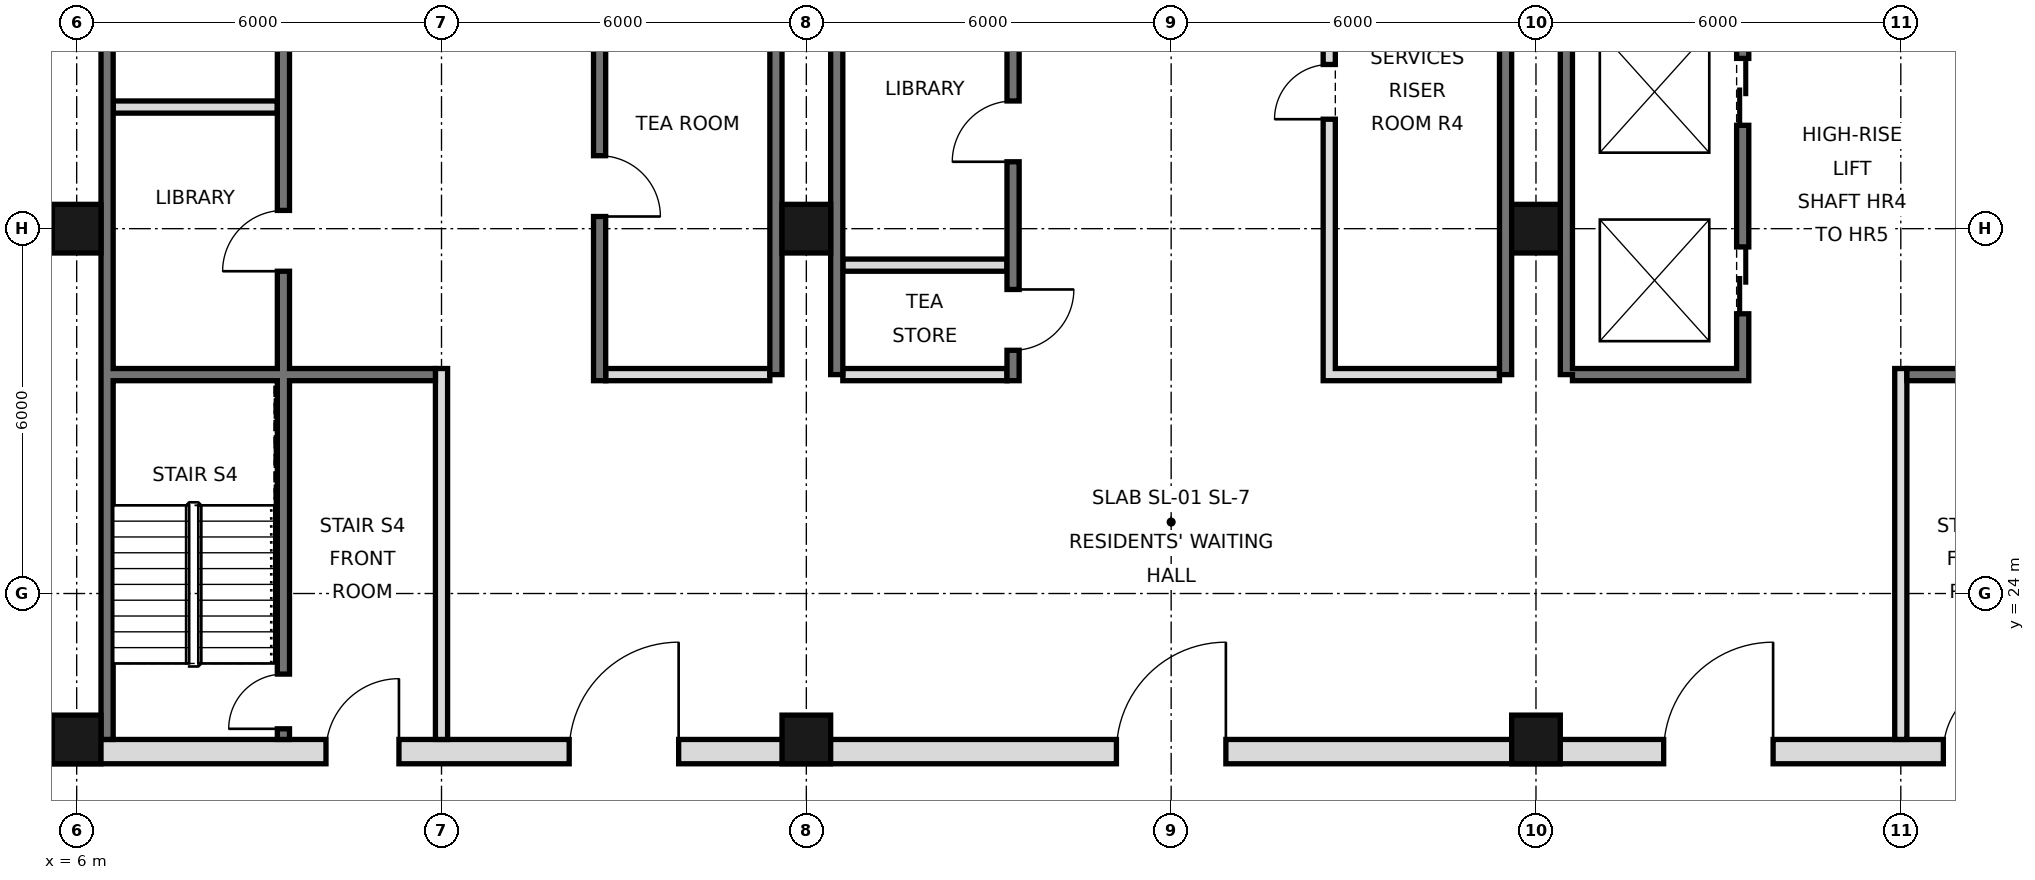
"""IFC4 building model, lengths in metres.
Left out: names, types, materials, properties, quantities, classifications, styles, units other than length and angle.
Written with IfcOpenShell. Run it as: python <this file> out.ifc"""

import sys

from ifc_helpers import new_model, si_unit, direction, frame, frame_2d, origin, origin_2d, place, context, subcontext, project, spatial, rectangle, hollow_rectangle, extrude, element, fill, save


model = new_model("IFC4")
c1 = context("Model", 3, precision=1e-05, world=origin(), true_north=direction((0.0, 1.0)))
c2 = subcontext(c1, "Body", "Model", "MODEL_VIEW")
j1 = project(units=[si_unit("LENGTHUNIT", "METRE"), si_unit("PLANEANGLEUNIT", "RADIAN")], contexts=[c1])
p1 = place(None, origin())
s1 = spatial("IfcSite", under=j1, at=p1, CompositionType="ELEMENT")
p2 = place(p1, origin())
s2 = spatial("IfcBuilding", under=s1, at=p2, CompositionType="ELEMENT")
p3 = place(p2, frame((0.0, 0.0, 226.2)))
s3 = spatial("IfcBuildingStorey", under=s2, at=p3, CompositionType="ELEMENT", Elevation=226.2)
for number, where, z_axis, x_axis in (
    (1, (6.0, 21.6, 0.0), (0.0, 0.0, 1.0), (1.0, 0.0, 0.0)),
    (2, (6.0, 30.0, 0.0), (0.0, 0.0, 1.0), (1.0, 0.0, 0.0)),
    (3, (18.0, 21.6, 0.0), (0.0, 0.0, 1.0), (1.0, 0.0, 0.0)),
    (4, (18.0, 30.0, 0.0), (0.0, 0.0, 1.0), (1.0, 0.0, 0.0)),
    (5, (30.0, 21.6, 0.0), (0.0, 0.0, 1.0), (1.0, 0.0, 0.0)),
    (6, (30.0, 30.0, 0.0), (0.0, 0.0, 1.0), (1.0, 0.0, 0.0)),
):
    element("IfcColumn", number, at=place(p3, frame(where, z_axis=z_axis, x_axis=x_axis)), inside=s3, PredefinedType="COLUMN", context=c2, shape_type="SweptSolid", body=[
        extrude(hollow_rectangle(XDim=0.8, YDim=0.8, WallThickness=0.04, at=origin_2d()), origin(), (0.0, 0.0, 1.0), 3.6),
    ])
p4 = place(p3, frame((6.5, 21.6, 0.0), z_axis=(0.0, 0.0, 1.0), x_axis=(0.0, 1.0, 0.0)))
e7 = element("IfcWall", 7, at=p4, inside=s3, PredefinedType="SOLIDWALL", context=c2, shape_type="SweptSolid", body=[
    extrude(rectangle(XDim=23.5, YDim=0.2, at=frame_2d((11.75, 0.0))), origin(), (0.0, 0.0, 1.0), 3.42),
])
for number, where, z_axis, x_axis in (
    (8, (17.5, 27.6, 0.0), (0.0, 0.0, 1.0), (0.0, 1.0, 0.0)),
    (9, (18.5, 27.6, 0.0), (0.0, 0.0, 1.0), (0.0, 1.0, 0.0)),
    (10, (29.5, 27.6, 0.0), (0.0, 0.0, 1.0), (0.0, 1.0, 0.0)),
    (11, (30.5, 27.6, 0.0), (0.0, 0.0, 1.0), (0.0, 1.0, 0.0)),
):
    element("IfcWall", number, at=place(p3, frame(where, z_axis=z_axis, x_axis=x_axis)), inside=s3, PredefinedType="SOLIDWALL", context=c2, shape_type="SweptSolid", body=[
        extrude(rectangle(XDim=17.5, YDim=0.2, at=frame_2d((8.75, 0.0))), origin(), (0.0, 0.0, 1.0), 3.42),
    ])
p5 = place(p3, frame((5.6, 21.4, 0.0), z_axis=(0.0, 0.0, 1.0), x_axis=(1.0, 0.0, 0.0)))
e12 = element("IfcWall", 12, at=p5, inside=s3, PredefinedType="SOLIDWALL", context=c2, shape_type="SweptSolid", body=[
    extrude(rectangle(XDim=36.8, YDim=0.4, at=frame_2d((18.4, 0.0))), origin(), (0.0, 0.0, 1.0), 3.42),
])
p6 = place(p5, frame((8.5, 0.0, 0.0)))
e13 = element("IfcOpeningElement", 13, at=p6, cuts=e12, PredefinedType="OPENING", context=c2, shape_type="SweptSolid", body=[
    extrude(rectangle(XDim=1.8, YDim=2.1, at=frame_2d((0.9, 1.05))), frame((0.0, 0.21, 0.0), z_axis=(0.0, -1.0, 0.0), x_axis=(1.0, 0.0, 0.0)), (0.0, 0.0, 1.0), 0.42),
])
p7 = place(p5, frame((17.5, 0.0, 0.0)))
e14 = element("IfcOpeningElement", 14, at=p7, cuts=e12, PredefinedType="OPENING", context=c2, shape_type="SweptSolid", body=[
    extrude(rectangle(XDim=1.8, YDim=2.1, at=frame_2d((0.9, 1.05))), frame((0.0, 0.21, 0.0), z_axis=(0.0, -1.0, 0.0), x_axis=(1.0, 0.0, 0.0)), (0.0, 0.0, 1.0), 0.42),
])
p8 = place(p5, frame((26.5, 0.0, 0.0)))
e15 = element("IfcOpeningElement", 15, at=p8, cuts=e12, PredefinedType="OPENING", context=c2, shape_type="SweptSolid", body=[
    extrude(rectangle(XDim=1.8, YDim=2.1, at=frame_2d((0.9, 1.05))), frame((0.0, 0.21, 0.0), z_axis=(0.0, -1.0, 0.0), x_axis=(1.0, 0.0, 0.0)), (0.0, 0.0, 1.0), 0.42),
])
p9 = place(p5, frame((4.5, 0.0, 0.0)))
e16 = element("IfcOpeningElement", 16, at=p9, cuts=e12, PredefinedType="OPENING", context=c2, shape_type="SweptSolid", body=[
    extrude(rectangle(XDim=1.2, YDim=2.1, at=frame_2d((0.6, 1.05))), frame((0.0, 0.21, 0.0), z_axis=(0.0, -1.0, 0.0), x_axis=(1.0, 0.0, 0.0)), (0.0, 0.0, 1.0), 0.42),
])
p10 = place(p5, frame((31.1, 0.0, 0.0)))
e17 = element("IfcOpeningElement", 17, at=p10, cuts=e12, PredefinedType="OPENING", context=c2, shape_type="SweptSolid", body=[
    extrude(rectangle(XDim=1.2, YDim=2.1, at=frame_2d((0.6, 1.05))), frame((0.0, 0.21, 0.0), z_axis=(0.0, -1.0, 0.0), x_axis=(1.0, 0.0, 0.0)), (0.0, 0.0, 1.0), 0.42),
])
p11 = place(p3, frame((12.0, 21.6, 0.0), z_axis=(0.0, 0.0, 1.0), x_axis=(0.0, 1.0, 0.0)))
e18 = element("IfcWall", 18, at=p11, inside=s3, PredefinedType="PARTITIONING", context=c2, shape_type="SweptSolid", body=[
    extrude(rectangle(XDim=6.1, YDim=0.2, at=frame_2d((3.05, 0.0))), origin(), (0.0, 0.0, 1.0), 3.42),
])
p12 = place(p3, frame((14.6, 27.5, 0.0), z_axis=(0.0, 0.0, 1.0), x_axis=(0.0, 1.0, 0.0)))
e19 = element("IfcWall", 19, at=p12, inside=s3, PredefinedType="SOLIDWALL", context=c2, shape_type="SweptSolid", body=[
    extrude(rectangle(XDim=17.5, YDim=0.2, at=frame_2d((8.75, 0.0))), origin(), (0.0, 0.0, 1.0), 3.42),
])
p13 = place(p12, frame((15.4, 0.0, 0.0)))
e20 = element("IfcOpeningElement", 20, at=p13, cuts=e19, PredefinedType="OPENING", context=c2, shape_type="SweptSolid", body=[
    extrude(rectangle(XDim=1.1, YDim=2.1, at=frame_2d((0.55, 1.05))), frame((0.0, 0.11, 0.0), z_axis=(0.0, -1.0, 0.0), x_axis=(1.0, 0.0, 0.0)), (0.0, 0.0, 1.0), 0.22),
])
p14 = place(p12, frame((2.7, 0.0, 0.0)))
e21 = element("IfcOpeningElement", 21, at=p14, cuts=e19, PredefinedType="OPENING", context=c2, shape_type="SweptSolid", body=[
    extrude(rectangle(XDim=1.0, YDim=2.1, at=frame_2d((0.5, 1.05))), frame((0.0, 0.11, 0.0), z_axis=(0.0, -1.0, 0.0), x_axis=(1.0, 0.0, 0.0)), (0.0, 0.0, 1.0), 0.22),
])
p15 = place(p12, frame((9.9, 0.0, 0.0)))
e22 = element("IfcOpeningElement", 22, at=p15, cuts=e19, PredefinedType="OPENING", context=c2, shape_type="SweptSolid", body=[
    extrude(rectangle(XDim=0.9, YDim=2.1, at=frame_2d((0.45, 1.05))), frame((0.0, 0.11, 0.0), z_axis=(0.0, -1.0, 0.0), x_axis=(1.0, 0.0, 0.0)), (0.0, 0.0, 1.0), 0.22),
])
p16 = place(p3, frame((21.4, 27.5, 0.0), z_axis=(0.0, 0.0, 1.0), x_axis=(0.0, 1.0, 0.0)))
e23 = element("IfcWall", 23, at=p16, inside=s3, PredefinedType="SOLIDWALL", context=c2, shape_type="SweptSolid", body=[
    extrude(rectangle(XDim=17.5, YDim=0.2, at=frame_2d((8.75, 0.0))), origin(), (0.0, 0.0, 1.0), 3.42),
])
p17 = place(p16, frame((0.5, 0.0, 0.0)))
e24 = element("IfcOpeningElement", 24, at=p17, cuts=e23, PredefinedType="OPENING", context=c2, shape_type="SweptSolid", body=[
    extrude(rectangle(XDim=1.0, YDim=2.1, at=frame_2d((0.5, 1.05))), frame((0.0, 0.11, 0.0), z_axis=(0.0, -1.0, 0.0), x_axis=(1.0, 0.0, 0.0)), (0.0, 0.0, 1.0), 0.22),
])
p18 = place(p16, frame((3.6, 0.0, 0.0)))
e25 = element("IfcOpeningElement", 25, at=p18, cuts=e23, PredefinedType="OPENING", context=c2, shape_type="SweptSolid", body=[
    extrude(rectangle(XDim=1.0, YDim=2.1, at=frame_2d((0.5, 1.05))), frame((0.0, 0.11, 0.0), z_axis=(0.0, -1.0, 0.0), x_axis=(1.0, 0.0, 0.0)), (0.0, 0.0, 1.0), 0.22),
])
p19 = place(p16, frame((16.2, 0.0, 0.0)))
e26 = element("IfcOpeningElement", 26, at=p19, cuts=e23, PredefinedType="OPENING", context=c2, shape_type="SweptSolid", body=[
    extrude(rectangle(XDim=1.0, YDim=2.1, at=frame_2d((0.5, 1.05))), frame((0.0, 0.11, 0.0), z_axis=(0.0, -1.0, 0.0), x_axis=(1.0, 0.0, 0.0)), (0.0, 0.0, 1.0), 0.22),
])
p20 = place(p16, frame((7.4, 0.0, 0.0)))
e27 = element("IfcOpeningElement", 27, at=p20, cuts=e23, PredefinedType="OPENING", context=c2, shape_type="SweptSolid", body=[
    extrude(rectangle(XDim=0.9, YDim=2.1, at=frame_2d((0.45, 1.05))), frame((0.0, 0.11, 0.0), z_axis=(0.0, -1.0, 0.0), x_axis=(1.0, 0.0, 0.0)), (0.0, 0.0, 1.0), 0.22),
])
p21 = place(p3, frame((26.6, 27.5, 0.0), z_axis=(0.0, 0.0, 1.0), x_axis=(0.0, 1.0, 0.0)))
e28 = element("IfcWall", 28, at=p21, inside=s3, PredefinedType="SOLIDWALL", context=c2, shape_type="SweptSolid", body=[
    extrude(rectangle(XDim=17.5, YDim=0.2, at=frame_2d((8.75, 0.0))), origin(), (0.0, 0.0, 1.0), 3.42),
])
p22 = place(p21, frame((4.3, 0.0, 0.0)))
e29 = element("IfcOpeningElement", 29, at=p22, cuts=e28, PredefinedType="OPENING", context=c2, shape_type="SweptSolid", body=[
    extrude(rectangle(XDim=0.9, YDim=2.1, at=frame_2d((0.45, 1.05))), frame((0.0, 0.11, 0.0), z_axis=(0.0, -1.0, 0.0), x_axis=(1.0, 0.0, 0.0)), (0.0, 0.0, 1.0), 0.22),
])
p23 = place(p21, frame((10.35, 0.0, 0.0)))
e30 = element("IfcOpeningElement", 30, at=p23, cuts=e28, PredefinedType="OPENING", context=c2, shape_type="SweptSolid", body=[
    extrude(rectangle(XDim=1.0, YDim=2.1, at=frame_2d((0.5, 1.05))), frame((0.0, 0.11, 0.0), z_axis=(0.0, -1.0, 0.0), x_axis=(1.0, 0.0, 0.0)), (0.0, 0.0, 1.0), 0.22),
])
p24 = place(p21, frame((14.575, 0.0, 0.0)))
e31 = element("IfcOpeningElement", 31, at=p24, cuts=e28, PredefinedType="OPENING", context=c2, shape_type="SweptSolid", body=[
    extrude(rectangle(XDim=1.0, YDim=2.1, at=frame_2d((0.5, 1.05))), frame((0.0, 0.11, 0.0), z_axis=(0.0, -1.0, 0.0), x_axis=(1.0, 0.0, 0.0)), (0.0, 0.0, 1.0), 0.22),
])
p25 = place(p3, frame((33.4, 27.5, 0.0), z_axis=(0.0, 0.0, 1.0), x_axis=(0.0, 1.0, 0.0)))
e32 = element("IfcWall", 32, at=p25, inside=s3, PredefinedType="SOLIDWALL", context=c2, shape_type="SweptSolid", body=[
    extrude(rectangle(XDim=17.5, YDim=0.2, at=frame_2d((8.75, 0.0))), origin(), (0.0, 0.0, 1.0), 3.42),
])
p26 = place(p25, frame((1.1, 0.0, 0.0)))
e33 = element("IfcOpeningElement", 33, at=p26, cuts=e32, PredefinedType="OPENING", context=c2, shape_type="SweptSolid", body=[
    extrude(rectangle(XDim=1.1, YDim=2.1, at=frame_2d((0.55, 1.05))), frame((0.0, 0.11, 0.0), z_axis=(0.0, -1.0, 0.0), x_axis=(1.0, 0.0, 0.0)), (0.0, 0.0, 1.0), 0.22),
])
p27 = place(p25, frame((4.2, 0.0, 0.0)))
e34 = element("IfcOpeningElement", 34, at=p27, cuts=e32, PredefinedType="OPENING", context=c2, shape_type="SweptSolid", body=[
    extrude(rectangle(XDim=1.1, YDim=2.1, at=frame_2d((0.55, 1.05))), frame((0.0, 0.11, 0.0), z_axis=(0.0, -1.0, 0.0), x_axis=(1.0, 0.0, 0.0)), (0.0, 0.0, 1.0), 0.22),
])
p28 = place(p25, frame((15.4, 0.0, 0.0)))
e35 = element("IfcOpeningElement", 35, at=p28, cuts=e32, PredefinedType="OPENING", context=c2, shape_type="SweptSolid", body=[
    extrude(rectangle(XDim=1.1, YDim=2.1, at=frame_2d((0.55, 1.05))), frame((0.0, 0.11, 0.0), z_axis=(0.0, -1.0, 0.0), x_axis=(1.0, 0.0, 0.0)), (0.0, 0.0, 1.0), 0.22),
])
p29 = place(p25, frame((9.9, 0.0, 0.0)))
e36 = element("IfcOpeningElement", 36, at=p29, cuts=e32, PredefinedType="OPENING", context=c2, shape_type="SweptSolid", body=[
    extrude(rectangle(XDim=0.9, YDim=2.1, at=frame_2d((0.45, 1.05))), frame((0.0, 0.11, 0.0), z_axis=(0.0, -1.0, 0.0), x_axis=(1.0, 0.0, 0.0)), (0.0, 0.0, 1.0), 0.22),
])
p30 = place(p3, frame((36.0, 21.6, 0.0), z_axis=(0.0, 0.0, 1.0), x_axis=(0.0, 1.0, 0.0)))
e37 = element("IfcWall", 37, at=p30, inside=s3, PredefinedType="PARTITIONING", context=c2, shape_type="SweptSolid", body=[
    extrude(rectangle(XDim=6.1, YDim=0.2, at=frame_2d((3.05, 0.0))), origin(), (0.0, 0.0, 1.0), 3.42),
])
p31 = place(p3, frame((9.4, 21.6, 0.0), z_axis=(0.0, 0.0, 1.0), x_axis=(0.0, 1.0, 0.0)))
e38 = element("IfcWall", 38, at=p31, inside=s3, PredefinedType="SOLIDWALL", context=c2, shape_type="SweptSolid", body=[
    extrude(rectangle(XDim=23.4, YDim=0.2, at=frame_2d((11.7, 0.0))), origin(), (0.0, 0.0, 1.0), 3.42),
])
p32 = place(p31, frame((7.7, 0.0, 0.0)))
e39 = element("IfcOpeningElement", 39, at=p32, cuts=e38, PredefinedType="OPENING", context=c2, shape_type="SweptSolid", body=[
    extrude(rectangle(XDim=1.0, YDim=2.1, at=frame_2d((0.5, 1.05))), frame((0.0, 0.11, 0.0), z_axis=(0.0, -1.0, 0.0), x_axis=(1.0, 0.0, 0.0)), (0.0, 0.0, 1.0), 0.22),
])
p33 = place(p31, frame((12.35, 0.0, 0.0)))
e40 = element("IfcOpeningElement", 40, at=p33, cuts=e38, PredefinedType="OPENING", context=c2, shape_type="SweptSolid", body=[
    extrude(rectangle(XDim=1.0, YDim=2.1, at=frame_2d((0.5, 1.05))), frame((0.0, 0.11, 0.0), z_axis=(0.0, -1.0, 0.0), x_axis=(1.0, 0.0, 0.0)), (0.0, 0.0, 1.0), 0.22),
])
p34 = place(p31, frame((22.1, 0.0, 0.0)))
e41 = element("IfcOpeningElement", 41, at=p34, cuts=e38, PredefinedType="OPENING", context=c2, shape_type="SweptSolid", body=[
    extrude(rectangle(XDim=1.0, YDim=2.1, at=frame_2d((0.5, 1.05))), frame((0.0, 0.11, 0.0), z_axis=(0.0, -1.0, 0.0), x_axis=(1.0, 0.0, 0.0)), (0.0, 0.0, 1.0), 0.22),
])
p35 = place(p31, frame((0.175, 0.0, 0.0)))
e42 = element("IfcOpeningElement", 42, at=p35, cuts=e38, PredefinedType="OPENING", context=c2, shape_type="SweptSolid", body=[
    extrude(rectangle(XDim=0.9, YDim=2.1, at=frame_2d((0.45, 1.05))), frame((0.0, 0.11, 0.0), z_axis=(0.0, -1.0, 0.0), x_axis=(1.0, 0.0, 0.0)), (0.0, 0.0, 1.0), 0.22),
])
for number, where, z_axis, x_axis in (
    (43, (14.7, 27.6, 0.0), (0.0, 0.0, 1.0), (1.0, 0.0, 0.0)),
    (44, (18.6, 27.6, 0.0), (0.0, 0.0, 1.0), (1.0, 0.0, 0.0)),
):
    element("IfcWall", number, at=place(p3, frame(where, z_axis=z_axis, x_axis=x_axis)), inside=s3, PredefinedType="PARTITIONING", context=c2, shape_type="SweptSolid", body=[
        extrude(rectangle(XDim=2.7, YDim=0.2, at=frame_2d((1.35, 0.0))), origin(), (0.0, 0.0, 1.0), 3.42),
    ])
for number, where, z_axis, x_axis in (
    (45, (26.7, 27.6, 0.0), (0.0, 0.0, 1.0), (1.0, 0.0, 0.0)),
    (46, (30.6, 27.6, 0.0), (0.0, 0.0, 1.0), (1.0, 0.0, 0.0)),
):
    element("IfcWall", number, at=place(p3, frame(where, z_axis=z_axis, x_axis=x_axis)), inside=s3, PredefinedType="SOLIDWALL", context=c2, shape_type="SweptSolid", body=[
        extrude(rectangle(XDim=2.7, YDim=0.2, at=frame_2d((1.35, 0.0))), origin(), (0.0, 0.0, 1.0), 3.42),
    ])
for number, where, z_axis, x_axis in (
    (47, (36.1, 27.6, 0.0), (0.0, 0.0, 1.0), (1.0, 0.0, 0.0)),
    (48, (6.6, 27.6, 0.0), (0.0, 0.0, 1.0), (1.0, 0.0, 0.0)),
):
    element("IfcWall", number, at=place(p3, frame(where, z_axis=z_axis, x_axis=x_axis)), inside=s3, PredefinedType="SOLIDWALL", context=c2, shape_type="SweptSolid", body=[
        extrude(rectangle(XDim=5.3, YDim=0.2, at=frame_2d((2.65, 0.0))), origin(), (0.0, 0.0, 1.0), 3.42),
    ])
for number, where, z_axis, x_axis in (
    (49, (18.6, 29.4, 0.0), (0.0, 0.0, 1.0), (1.0, 0.0, 0.0)),
    (50, (6.6, 32.0, 0.0), (0.0, 0.0, 1.0), (1.0, 0.0, 0.0)),
):
    element("IfcWall", number, at=place(p3, frame(where, z_axis=z_axis, x_axis=x_axis)), inside=s3, PredefinedType="PARTITIONING", context=c2, shape_type="SweptSolid", body=[
        extrude(rectangle(XDim=2.7, YDim=0.2, at=frame_2d((1.35, 0.0))), origin(), (0.0, 0.0, 1.0), 3.42),
    ])
p36 = place(p6, frame((1.8, 0.0, 0.0), z_axis=(0.0, 0.0, 1.0), x_axis=(-1.0, 0.0, 0.0)))
e51 = element("IfcDoor", 51, at=p36, inside=s3, OperationType="SINGLE_SWING_LEFT", PredefinedType="DOOR", context=c2, shape_type="SweptSolid", body=[
    extrude(rectangle(XDim=1.8, YDim=2.1, at=frame_2d((0.9, 1.05))), frame((0.0, 0.025, 0.0), z_axis=(0.0, -1.0, 0.0), x_axis=(1.0, 0.0, 0.0)), (0.0, 0.0, 1.0), 0.05),
])
fill(e13, e51)
p37 = place(p7, frame((1.8, 0.0, 0.0), z_axis=(0.0, 0.0, 1.0), x_axis=(-1.0, 0.0, 0.0)))
e52 = element("IfcDoor", 52, at=p37, inside=s3, OperationType="SINGLE_SWING_LEFT", PredefinedType="DOOR", context=c2, shape_type="SweptSolid", body=[
    extrude(rectangle(XDim=1.8, YDim=2.1, at=frame_2d((0.9, 1.05))), frame((0.0, 0.025, 0.0), z_axis=(0.0, -1.0, 0.0), x_axis=(1.0, 0.0, 0.0)), (0.0, 0.0, 1.0), 0.05),
])
fill(e14, e52)
p38 = place(p8, frame((1.8, 0.0, 0.0), z_axis=(0.0, 0.0, 1.0), x_axis=(-1.0, 0.0, 0.0)))
e53 = element("IfcDoor", 53, at=p38, inside=s3, OperationType="SINGLE_SWING_LEFT", PredefinedType="DOOR", context=c2, shape_type="SweptSolid", body=[
    extrude(rectangle(XDim=1.8, YDim=2.1, at=frame_2d((0.9, 1.05))), frame((0.0, 0.025, 0.0), z_axis=(0.0, -1.0, 0.0), x_axis=(1.0, 0.0, 0.0)), (0.0, 0.0, 1.0), 0.05),
])
fill(e15, e53)
p39 = place(p9, frame((1.2, 0.0, 0.0), z_axis=(0.0, 0.0, 1.0), x_axis=(-1.0, 0.0, 0.0)))
e54 = element("IfcDoor", 54, at=p39, inside=s3, OperationType="SINGLE_SWING_LEFT", PredefinedType="DOOR", context=c2, shape_type="SweptSolid", body=[
    extrude(rectangle(XDim=1.2, YDim=2.1, at=frame_2d((0.6, 1.05))), frame((0.0, 0.025, 0.0), z_axis=(0.0, -1.0, 0.0), x_axis=(1.0, 0.0, 0.0)), (0.0, 0.0, 1.0), 0.05),
])
fill(e16, e54)
p40 = place(p10, frame((1.2, 0.0, 0.0), z_axis=(0.0, 0.0, 1.0), x_axis=(-1.0, 0.0, 0.0)))
e55 = element("IfcDoor", 55, at=p40, inside=s3, OperationType="SINGLE_SWING_LEFT", PredefinedType="DOOR", context=c2, shape_type="SweptSolid", body=[
    extrude(rectangle(XDim=1.2, YDim=2.1, at=frame_2d((0.6, 1.05))), frame((0.0, 0.025, 0.0), z_axis=(0.0, -1.0, 0.0), x_axis=(1.0, 0.0, 0.0)), (0.0, 0.0, 1.0), 0.05),
])
fill(e17, e55)
p41 = place(p26, origin())
e56 = element("IfcDoor", 56, at=p41, inside=s3, OperationType="DOUBLE_DOOR_SLIDING", PredefinedType="DOOR", context=c2, shape_type="SweptSolid", body=[
    extrude(rectangle(XDim=1.1, YDim=2.1, at=frame_2d((0.55, 1.05))), frame((0.0, 0.025, 0.0), z_axis=(0.0, -1.0, 0.0), x_axis=(1.0, 0.0, 0.0)), (0.0, 0.0, 1.0), 0.05),
])
fill(e33, e56)
p42 = place(p27, origin())
e57 = element("IfcDoor", 57, at=p42, inside=s3, OperationType="DOUBLE_DOOR_SLIDING", PredefinedType="DOOR", context=c2, shape_type="SweptSolid", body=[
    extrude(rectangle(XDim=1.1, YDim=2.1, at=frame_2d((0.55, 1.05))), frame((0.0, 0.025, 0.0), z_axis=(0.0, -1.0, 0.0), x_axis=(1.0, 0.0, 0.0)), (0.0, 0.0, 1.0), 0.05),
])
fill(e34, e57)
p43 = place(p17, origin())
e58 = element("IfcDoor", 58, at=p43, inside=s3, OperationType="SINGLE_SWING_RIGHT", PredefinedType="DOOR", context=c2, shape_type="SweptSolid", body=[
    extrude(rectangle(XDim=1.0, YDim=2.1, at=frame_2d((0.5, 1.05))), frame((0.0, 0.025, 0.0), z_axis=(0.0, -1.0, 0.0), x_axis=(1.0, 0.0, 0.0)), (0.0, 0.0, 1.0), 0.05),
])
fill(e24, e58)
p44 = place(p18, origin())
e59 = element("IfcDoor", 59, at=p44, inside=s3, OperationType="SINGLE_SWING_LEFT", PredefinedType="DOOR", context=c2, shape_type="SweptSolid", body=[
    extrude(rectangle(XDim=1.0, YDim=2.1, at=frame_2d((0.5, 1.05))), frame((0.0, 0.025, 0.0), z_axis=(0.0, -1.0, 0.0), x_axis=(1.0, 0.0, 0.0)), (0.0, 0.0, 1.0), 0.05),
])
fill(e25, e59)
p45 = place(p14, frame((1.0, 0.0, 0.0), z_axis=(0.0, 0.0, 1.0), x_axis=(-1.0, 0.0, 0.0)))
e60 = element("IfcDoor", 60, at=p45, inside=s3, OperationType="SINGLE_SWING_RIGHT", PredefinedType="DOOR", context=c2, shape_type="SweptSolid", body=[
    extrude(rectangle(XDim=1.0, YDim=2.1, at=frame_2d((0.5, 1.05))), frame((0.0, 0.025, 0.0), z_axis=(0.0, -1.0, 0.0), x_axis=(1.0, 0.0, 0.0)), (0.0, 0.0, 1.0), 0.05),
])
fill(e21, e60)
p46 = place(p32, origin())
e61 = element("IfcDoor", 61, at=p46, inside=s3, OperationType="SINGLE_SWING_LEFT", PredefinedType="DOOR", context=c2, shape_type="SweptSolid", body=[
    extrude(rectangle(XDim=1.0, YDim=2.1, at=frame_2d((0.5, 1.05))), frame((0.0, 0.025, 0.0), z_axis=(0.0, -1.0, 0.0), x_axis=(1.0, 0.0, 0.0)), (0.0, 0.0, 1.0), 0.05),
])
fill(e39, e61)
p47 = place(p35, origin())
e62 = element("IfcDoor", 62, at=p47, inside=s3, OperationType="SINGLE_SWING_LEFT", PredefinedType="DOOR", context=c2, shape_type="SweptSolid", body=[
    extrude(rectangle(XDim=0.9, YDim=2.1, at=frame_2d((0.45, 1.05))), frame((0.0, 0.025, 0.0), z_axis=(0.0, -1.0, 0.0), x_axis=(1.0, 0.0, 0.0)), (0.0, 0.0, 1.0), 0.05),
])
fill(e42, e62)
p48 = place(p22, origin())
e63 = element("IfcDoor", 63, at=p48, inside=s3, OperationType="SINGLE_SWING_LEFT", PredefinedType="DOOR", context=c2, shape_type="SweptSolid", body=[
    extrude(rectangle(XDim=0.9, YDim=2.1, at=frame_2d((0.45, 1.05))), frame((0.0, 0.025, 0.0), z_axis=(0.0, -1.0, 0.0), x_axis=(1.0, 0.0, 0.0)), (0.0, 0.0, 1.0), 0.05),
])
fill(e29, e63)
save(model, sys.argv[1])
